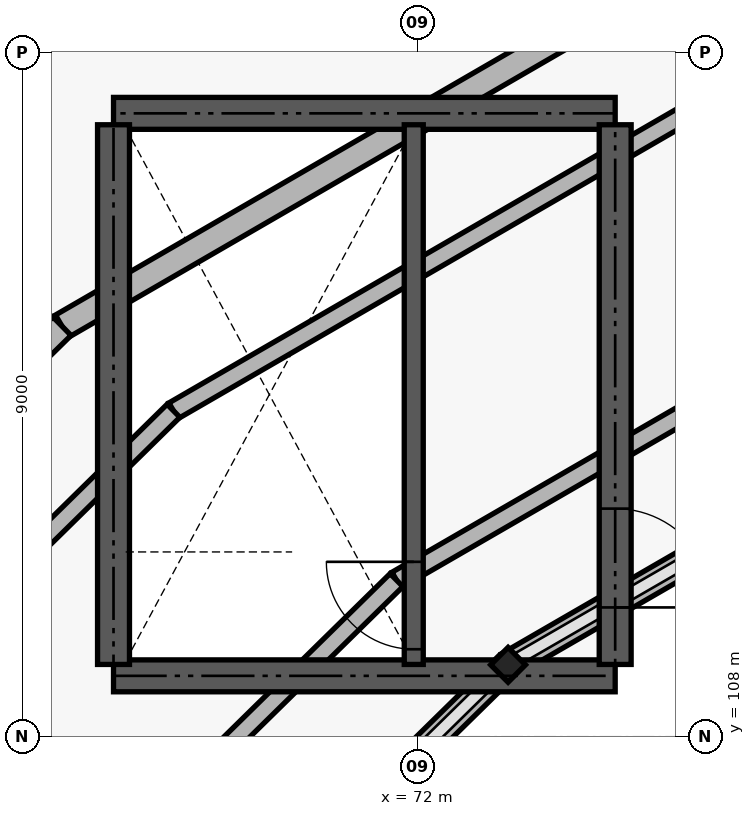
"""IFC4 building model, lengths in metres.
Left out: names, types, materials, properties, quantities, classifications, styles, units other than length and angle.
Written with IfcOpenShell. Run it as: python <this file> out.ifc"""

import sys

from ifc_helpers import new_model, si_unit, direction, frame, frame_2d, origin, origin_2d, place, context, subcontext, project, spatial, rectangle, hollow_circle, extrude, element, fill, save


model = new_model("IFC4")
c1 = context("Model", 3, precision=1e-05, world=origin(), true_north=direction((0.0, 1.0)))
c2 = subcontext(c1, "Body", "Model", "MODEL_VIEW")
j1 = project(units=[si_unit("LENGTHUNIT", "METRE"), si_unit("PLANEANGLEUNIT", "RADIAN")], contexts=[c1])
p1 = place(None, origin())
s1 = spatial("IfcSite", under=j1, at=p1, CompositionType="ELEMENT")
p2 = place(p1, origin())
s2 = spatial("IfcBuilding", under=s1, at=p2, CompositionType="ELEMENT")
p3 = place(p2, frame((0.0, 0.0, 9.6)))
s3 = spatial("IfcBuildingStorey", under=s2, at=p3, CompositionType="ELEMENT", Elevation=9.6)
p4 = place(p3, frame((73.191, 108.945, 0.0), z_axis=(0.0, 0.0, 1.0), x_axis=(-0.707106781187, 0.707106781187, 0.0)))
e1 = element("IfcColumn", 1, at=p4, inside=s3, PredefinedType="COLUMN", context=c2, shape_type="SweptSolid", body=[
    extrude(hollow_circle(Radius=0.162, WallThickness=0.016, at=origin_2d()), origin(), (0.0, 0.0, 1.0), 4.38),
])
p5 = place(p3, frame((76.6, 118.772, 4.53), z_axis=(0.0, 0.0, 1.0), x_axis=(-0.865403937833, -0.501074869039, 0.0)))
e2 = element("IfcWall", 2, at=p5, inside=s3, PredefinedType="SOLIDWALL", context=c2, shape_type="SweptSolid", body=[
    extrude(rectangle(XDim=10.721, YDim=0.34, at=frame_2d((5.361, 0.0))), origin(), (0.0, 0.0, 1.0), 3.02),
])
p6 = place(p3, frame((80.75, 113.316, 4.39), z_axis=(0.0, 0.0, 1.0), x_axis=(-0.865697347457, -0.500567780231, 0.0)))
e3 = element("IfcWall", 3, at=p6, inside=s3, PredefinedType="SOLIDWALL", context=c2, shape_type="SweptSolid", body=[
    extrude(rectangle(XDim=8.732, YDim=0.34, at=frame_2d((4.366, 0.0))), origin(), (0.0, 0.0, 1.0), 3.16),
])
p7 = place(p3, frame((77.638, 117.408, 7.58), z_axis=(0.0, 0.0, 1.0), x_axis=(-0.865518915909, -0.50087623841, 0.0)))
e4 = element("IfcWall", 4, at=p7, inside=s3, PredefinedType="SOLIDWALL", context=c2, shape_type="SweptSolid", body=[
    extrude(rectangle(XDim=10.224, YDim=0.24, at=frame_2d((5.112, 0.0))), origin(), (0.0, 0.0, 1.0), 2.37),
])
p8 = place(p3, frame((79.713, 114.68, 7.58), z_axis=(0.0, 0.0, 1.0), x_axis=(-0.865657994778, -0.500635831795, 0.0)))
e5 = element("IfcWall", 5, at=p8, inside=s3, PredefinedType="SOLIDWALL", context=c2, shape_type="SweptSolid", body=[
    extrude(rectangle(XDim=9.23, YDim=0.24, at=frame_2d((4.615, 0.0))), origin(), (0.0, 0.0, 1.0), 2.37),
])
p9 = place(p3, frame((67.322, 113.4, 4.53), z_axis=(0.0, 0.0, 1.0), x_axis=(-0.713096204455, -0.701066190307, 0.0)))
e6 = element("IfcWall", 6, at=p9, inside=s3, PredefinedType="SOLIDWALL", context=c2, shape_type="SweptSolid", body=[
    extrude(rectangle(XDim=9.985, YDim=0.34, at=frame_2d((4.992, 0.0))), origin(), (0.0, 0.0, 1.0), 3.02),
])
p10 = place(p3, frame((73.191, 108.945, 4.39), z_axis=(0.0, 0.0, 1.0), x_axis=(-0.713593723838, -0.700559774251, 0.0)))
e7 = element("IfcWall", 7, at=p10, inside=s3, PredefinedType="SOLIDWALL", context=c2, shape_type="SweptSolid", body=[
    extrude(rectangle(XDim=8.129, YDim=0.34, at=frame_2d((4.065, 0.0))), origin(), (0.0, 0.0, 1.0), 3.16),
])
p11 = place(p3, frame((68.789, 112.287, 7.58), z_axis=(0.0, 0.0, 1.0), x_axis=(-0.71311938496, -0.701042611254, 0.0)))
e8 = element("IfcWall", 8, at=p11, inside=s3, PredefinedType="SOLIDWALL", context=c2, shape_type="SweptSolid", body=[
    extrude(rectangle(XDim=9.521, YDim=0.24, at=frame_2d((4.761, 0.0))), origin(), (0.0, 0.0, 1.0), 2.37),
])
p12 = place(p3, frame((71.723, 110.059, 7.58), z_axis=(0.0, 0.0, 1.0), x_axis=(-0.713357861119, -0.700799944335, 0.0)))
e9 = element("IfcWall", 9, at=p12, inside=s3, PredefinedType="SOLIDWALL", context=c2, shape_type="SweptSolid", body=[
    extrude(rectangle(XDim=8.593, YDim=0.24, at=frame_2d((4.296, 0.0))), origin(), (0.0, 0.0, 1.0), 2.37),
])
for number, where, z_axis, x_axis in (
    (10, (68.0, 108.8, 0.0), (0.0, 0.0, 1.0), (1.0, 0.0, 0.0)),
    (11, (68.0, 116.2, 0.0), (0.0, 0.0, 1.0), (1.0, 0.0, 0.0)),
):
    element("IfcWall", number, at=place(p3, frame(where, z_axis=z_axis, x_axis=x_axis)), inside=s3, PredefinedType="SHEAR", context=c2, shape_type="SweptSolid", body=[
        extrude(rectangle(XDim=6.6, YDim=0.42, at=frame_2d((3.3, 0.0))), origin(), (0.0, 0.0, 1.0), 3.4),
    ])
p13 = place(p3, frame((68.0, 108.95, 0.0), z_axis=(0.0, 0.0, 1.0), x_axis=(0.0, 1.0, 0.0)))
e12 = element("IfcWall", 12, at=p13, inside=s3, PredefinedType="SHEAR", context=c2, shape_type="SweptSolid", body=[
    extrude(rectangle(XDim=7.1, YDim=0.42, at=frame_2d((3.55, 0.0))), origin(), (0.0, 0.0, 1.0), 3.4),
])
p14 = place(p3, frame((74.6, 108.95, 0.0), z_axis=(0.0, 0.0, 1.0), x_axis=(0.0, 1.0, 0.0)))
e13 = element("IfcWall", 13, at=p14, inside=s3, PredefinedType="SHEAR", context=c2, shape_type="SweptSolid", body=[
    extrude(rectangle(XDim=7.1, YDim=0.42, at=frame_2d((3.55, 0.0))), origin(), (0.0, 0.0, 1.0), 3.4),
])
p15 = place(p14, frame((0.75, 0.0, 0.0)))
e14 = element("IfcOpeningElement", 14, at=p15, cuts=e13, PredefinedType="OPENING", context=c2, shape_type="SweptSolid", body=[
    extrude(rectangle(XDim=1.3, YDim=2.15, at=frame_2d((0.65, 1.075))), frame((0.0, 0.22, 0.0), z_axis=(0.0, -1.0, 0.0), x_axis=(1.0, 0.0, 0.0)), (0.0, 0.0, 1.0), 0.44),
])
p16 = place(p3, frame((71.95, 108.95, 0.0), z_axis=(0.0, 0.0, 1.0), x_axis=(0.0, 1.0, 0.0)))
e15 = element("IfcWall", 15, at=p16, inside=s3, PredefinedType="SHEAR", context=c2, shape_type="SweptSolid", body=[
    extrude(rectangle(XDim=7.1, YDim=0.25, at=frame_2d((3.55, 0.0))), origin(), (0.0, 0.0, 1.0), 3.4),
])
p17 = place(p16, frame((0.2, 0.0, 0.0)))
e16 = element("IfcOpeningElement", 16, at=p17, cuts=e15, PredefinedType="OPENING", context=c2, shape_type="SweptSolid", body=[
    extrude(rectangle(XDim=1.15, YDim=2.15, at=frame_2d((0.575, 1.075))), frame((0.0, 0.135, 0.0), z_axis=(0.0, -1.0, 0.0), x_axis=(1.0, 0.0, 0.0)), (0.0, 0.0, 1.0), 0.27),
])
p18 = place(p15, frame((1.3, 0.0, 0.0), z_axis=(0.0, 0.0, 1.0), x_axis=(-1.0, 0.0, 0.0)))
e17 = element("IfcDoor", 17, at=p18, inside=s3, OperationType="DOUBLE_DOOR_SINGLE_SWING", PredefinedType="DOOR", context=c2, shape_type="SweptSolid", body=[
    extrude(rectangle(XDim=1.3, YDim=2.15, at=frame_2d((0.65, 1.075))), frame((0.0, 0.025, 0.0), z_axis=(0.0, -1.0, 0.0), x_axis=(1.0, 0.0, 0.0)), (0.0, 0.0, 1.0), 0.05),
])
fill(e14, e17)
p19 = place(p17, frame((1.15, 0.0, 0.0), z_axis=(0.0, 0.0, 1.0), x_axis=(-1.0, 0.0, 0.0)))
e18 = element("IfcDoor", 18, at=p19, inside=s3, OperationType="SINGLE_SWING_RIGHT", PredefinedType="DOOR", context=c2, shape_type="SweptSolid", body=[
    extrude(rectangle(XDim=1.15, YDim=2.15, at=frame_2d((0.575, 1.075))), frame((0.0, 0.025, 0.0), z_axis=(0.0, -1.0, 0.0), x_axis=(1.0, 0.0, 0.0)), (0.0, 0.0, 1.0), 0.05),
])
fill(e16, e18)
save(model, sys.argv[1])
